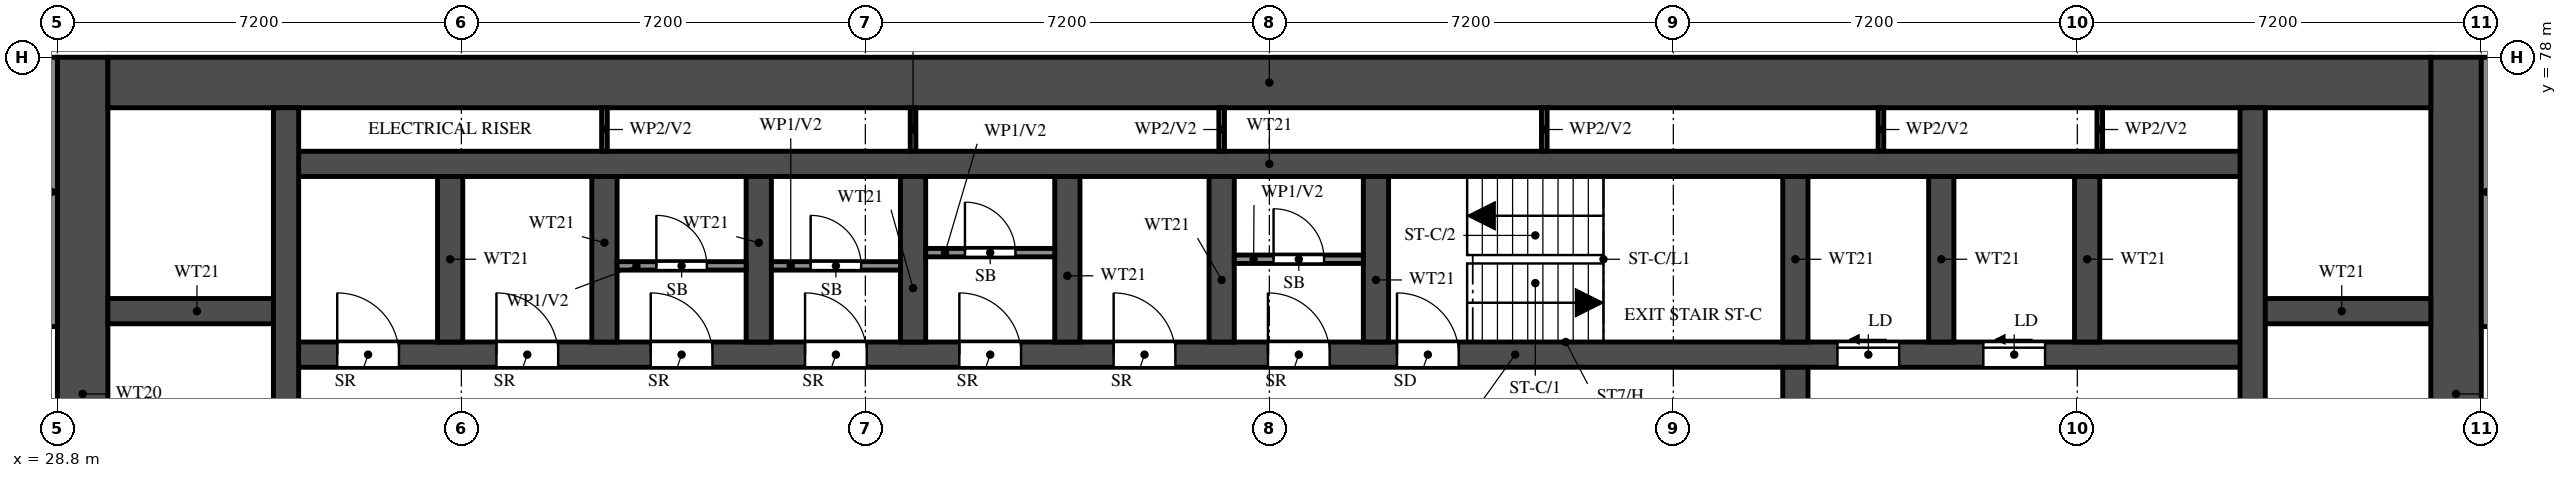
"""IFC4 building model, lengths in metres.
Left out: names, types, materials, properties, quantities, classifications, styles, units other than length and angle.
Written with IfcOpenShell. Run it as: python <this file> out.ifc"""

import sys

from ifc_helpers import new_model, si_unit, direction, frame, frame_2d, origin, place, context, subcontext, project, spatial, rectangle, extrude, element, fill, save


model = new_model("IFC4")
c1 = context("Model", 3, precision=1e-05, world=origin(), true_north=direction((0.0, 1.0)))
c2 = subcontext(c1, "Body", "Model", "MODEL_VIEW")
j1 = project(units=[si_unit("LENGTHUNIT", "METRE"), si_unit("PLANEANGLEUNIT", "RADIAN")], contexts=[c1])
p1 = place(None, origin())
s1 = spatial("IfcSite", under=j1, at=p1, CompositionType="ELEMENT")
p2 = place(p1, origin())
s2 = spatial("IfcBuilding", under=s1, at=p2, CompositionType="ELEMENT")
p3 = place(p2, frame((0.0, 0.0, 69.0)))
s3 = spatial("IfcBuildingStorey", under=s2, at=p3, CompositionType="ELEMENT", Elevation=69.0)
for number, where, z_axis, x_axis in (
    (1, (29.25, 66.0, 0.0), (0.0, 0.0, 1.0), (0.0, 1.0, 0.0)),
    (2, (71.55, 66.0, 0.0), (0.0, 0.0, 1.0), (0.0, 1.0, 0.0)),
):
    element("IfcWall", number, at=place(p3, frame(where, z_axis=z_axis, x_axis=x_axis)), inside=s3, PredefinedType="SHEAR", context=c2, shape_type="SweptSolid", body=[
        extrude(rectangle(XDim=12.0, YDim=0.9, at=frame_2d((6.0, 0.0))), origin(), (0.0, 0.0, 1.0), 3.18),
    ])
p4 = place(p3, frame((29.7, 77.55, 0.0), z_axis=(0.0, 0.0, 1.0), x_axis=(1.0, 0.0, 0.0)))
e3 = element("IfcWall", 3, at=p4, inside=s3, PredefinedType="SHEAR", context=c2, shape_type="SweptSolid", body=[
    extrude(rectangle(XDim=41.4, YDim=0.9, at=frame_2d((20.7, 0.0))), origin(), (0.0, 0.0, 1.0), 3.18),
])
p5 = place(p3, frame((32.875, 72.7, 0.0), z_axis=(0.0, 0.0, 1.0), x_axis=(1.0, 0.0, 0.0)))
e4 = element("IfcWall", 4, at=p5, inside=s3, PredefinedType="SHEAR", context=c2, shape_type="SweptSolid", body=[
    extrude(rectangle(XDim=35.05, YDim=0.45, at=frame_2d((17.525, 0.0))), origin(), (0.0, 0.0, 1.0), 3.18),
])
p6 = place(p5, frame((19.8, 0.0, 0.0)))
e5 = element("IfcOpeningElement", 5, at=p6, cuts=e4, PredefinedType="OPENING", context=c2, shape_type="SweptSolid", body=[
    extrude(rectangle(XDim=1.1, YDim=2.1, at=frame_2d((0.55, 1.05))), frame((0.0, 0.235, 0.0), z_axis=(0.0, -1.0, 0.0), x_axis=(1.0, 0.0, 0.0)), (0.0, 0.0, 1.0), 0.47),
])
p7 = place(p5, frame((27.65, 0.0, 0.0)))
e6 = element("IfcOpeningElement", 6, at=p7, cuts=e4, PredefinedType="OPENING", context=c2, shape_type="SweptSolid", body=[
    extrude(rectangle(XDim=1.1, YDim=2.1, at=frame_2d((0.55, 1.05))), frame((0.0, 0.235, 0.0), z_axis=(0.0, -1.0, 0.0), x_axis=(1.0, 0.0, 0.0)), (0.0, 0.0, 1.0), 0.47),
])
p8 = place(p5, frame((30.25, 0.0, 0.0)))
e7 = element("IfcOpeningElement", 7, at=p8, cuts=e4, PredefinedType="OPENING", context=c2, shape_type="SweptSolid", body=[
    extrude(rectangle(XDim=1.1, YDim=2.1, at=frame_2d((0.55, 1.05))), frame((0.0, 0.235, 0.0), z_axis=(0.0, -1.0, 0.0), x_axis=(1.0, 0.0, 0.0)), (0.0, 0.0, 1.0), 0.47),
])
p9 = place(p5, frame((3.75, 0.0, 0.0)))
e8 = element("IfcOpeningElement", 8, at=p9, cuts=e4, PredefinedType="OPENING", context=c2, shape_type="SweptSolid", body=[
    extrude(rectangle(XDim=1.1, YDim=2.1, at=frame_2d((0.55, 1.05))), frame((0.0, 0.235, 0.0), z_axis=(0.0, -1.0, 0.0), x_axis=(1.0, 0.0, 0.0)), (0.0, 0.0, 1.0), 0.47),
])
p10 = place(p5, frame((6.5, 0.0, 0.0)))
e9 = element("IfcOpeningElement", 9, at=p10, cuts=e4, PredefinedType="OPENING", context=c2, shape_type="SweptSolid", body=[
    extrude(rectangle(XDim=1.1, YDim=2.1, at=frame_2d((0.55, 1.05))), frame((0.0, 0.235, 0.0), z_axis=(0.0, -1.0, 0.0), x_axis=(1.0, 0.0, 0.0)), (0.0, 0.0, 1.0), 0.47),
])
p11 = place(p5, frame((9.25, 0.0, 0.0)))
e10 = element("IfcOpeningElement", 10, at=p11, cuts=e4, PredefinedType="OPENING", context=c2, shape_type="SweptSolid", body=[
    extrude(rectangle(XDim=1.1, YDim=2.1, at=frame_2d((0.55, 1.05))), frame((0.0, 0.235, 0.0), z_axis=(0.0, -1.0, 0.0), x_axis=(1.0, 0.0, 0.0)), (0.0, 0.0, 1.0), 0.47),
])
p12 = place(p5, frame((12.0, 0.0, 0.0)))
e11 = element("IfcOpeningElement", 11, at=p12, cuts=e4, PredefinedType="OPENING", context=c2, shape_type="SweptSolid", body=[
    extrude(rectangle(XDim=1.1, YDim=2.1, at=frame_2d((0.55, 1.05))), frame((0.0, 0.235, 0.0), z_axis=(0.0, -1.0, 0.0), x_axis=(1.0, 0.0, 0.0)), (0.0, 0.0, 1.0), 0.47),
])
p13 = place(p5, frame((14.75, 0.0, 0.0)))
e12 = element("IfcOpeningElement", 12, at=p13, cuts=e4, PredefinedType="OPENING", context=c2, shape_type="SweptSolid", body=[
    extrude(rectangle(XDim=1.1, YDim=2.1, at=frame_2d((0.55, 1.05))), frame((0.0, 0.235, 0.0), z_axis=(0.0, -1.0, 0.0), x_axis=(1.0, 0.0, 0.0)), (0.0, 0.0, 1.0), 0.47),
])
p14 = place(p5, frame((17.5, 0.0, 0.0)))
e13 = element("IfcOpeningElement", 13, at=p14, cuts=e4, PredefinedType="OPENING", context=c2, shape_type="SweptSolid", body=[
    extrude(rectangle(XDim=1.1, YDim=2.1, at=frame_2d((0.55, 1.05))), frame((0.0, 0.235, 0.0), z_axis=(0.0, -1.0, 0.0), x_axis=(1.0, 0.0, 0.0)), (0.0, 0.0, 1.0), 0.47),
])
p15 = place(p5, frame((0.913, 0.0, 0.0)))
e14 = element("IfcOpeningElement", 14, at=p15, cuts=e4, PredefinedType="OPENING", context=c2, shape_type="SweptSolid", body=[
    extrude(rectangle(XDim=1.1, YDim=2.1, at=frame_2d((0.55, 1.05))), frame((0.0, 0.235, 0.0), z_axis=(0.0, -1.0, 0.0), x_axis=(1.0, 0.0, 0.0)), (0.0, 0.0, 1.0), 0.47),
])
p16 = place(p3, frame((32.875, 76.1, 0.0), z_axis=(0.0, 0.0, 1.0), x_axis=(1.0, 0.0, 0.0)))
e15 = element("IfcWall", 15, at=p16, inside=s3, PredefinedType="SHEAR", context=c2, shape_type="SweptSolid", body=[
    extrude(rectangle(XDim=35.05, YDim=0.45, at=frame_2d((17.525, 0.0))), origin(), (0.0, 0.0, 1.0), 3.18),
])
for number, where, z_axis, x_axis in (
    (16, (29.7, 73.475, 0.0), (0.0, 0.0, 1.0), (1.0, 0.0, 0.0)),
    (17, (67.925, 73.475, 0.0), (0.0, 0.0, 1.0), (1.0, 0.0, 0.0)),
):
    element("IfcWall", number, at=place(p3, frame(where, z_axis=z_axis, x_axis=x_axis)), inside=s3, PredefinedType="SHEAR", context=c2, shape_type="SweptSolid", body=[
        extrude(rectangle(XDim=3.175, YDim=0.45, at=frame_2d((1.587, 0.0))), origin(), (0.0, 0.0, 1.0), 3.18),
    ])
p17 = place(p3, frame((32.875, 66.45, 0.0), z_axis=(0.0, 0.0, 1.0), x_axis=(0.0, 1.0, 0.0)))
e18 = element("IfcWall", 18, at=p17, inside=s3, PredefinedType="SHEAR", context=c2, shape_type="SweptSolid", body=[
    extrude(rectangle(XDim=10.65, YDim=0.45, at=frame_2d((5.325, 0.0))), origin(), (0.0, 0.0, 1.0), 3.18),
])
p18 = place(p3, frame((67.925, 66.45, 0.0), z_axis=(0.0, 0.0, 1.0), x_axis=(0.0, 1.0, 0.0)))
e19 = element("IfcWall", 19, at=p18, inside=s3, PredefinedType="SHEAR", context=c2, shape_type="SweptSolid", body=[
    extrude(rectangle(XDim=10.65, YDim=0.45, at=frame_2d((5.325, 0.0))), origin(), (0.0, 0.0, 1.0), 3.18),
])
p19 = place(p18, frame((0.15, 0.0, 0.0)))
e20 = element("IfcOpeningElement", 20, at=p19, cuts=e19, PredefinedType="OPENING", context=c2, shape_type="SweptSolid", body=[
    extrude(rectangle(XDim=1.1, YDim=2.1, at=frame_2d((0.55, 1.05))), frame((0.0, 0.235, 0.0), z_axis=(0.0, -1.0, 0.0), x_axis=(1.0, 0.0, 0.0)), (0.0, 0.0, 1.0), 0.47),
])
p20 = place(p3, frame((59.775, 66.45, 0.0), z_axis=(0.0, 0.0, 1.0), x_axis=(0.0, 1.0, 0.0)))
e21 = element("IfcWall", 21, at=p20, inside=s3, PredefinedType="SHEAR", context=c2, shape_type="SweptSolid", body=[
    extrude(rectangle(XDim=6.025, YDim=0.45, at=frame_2d((3.013, 0.0))), origin(), (0.0, 0.0, 1.0), 3.18),
])
p21 = place(p20, frame((3.85, 0.0, 0.0)))
e22 = element("IfcOpeningElement", 22, at=p21, cuts=e21, PredefinedType="OPENING", context=c2, shape_type="SweptSolid", body=[
    extrude(rectangle(XDim=1.2, YDim=2.1, at=frame_2d((0.6, 1.05))), frame((0.0, 0.235, 0.0), z_axis=(0.0, -1.0, 0.0), x_axis=(1.0, 0.0, 0.0)), (0.0, 0.0, 1.0), 0.47),
])
for number, where, z_axis, x_axis in (
    (23, (59.775, 72.925, 0.0), (0.0, 0.0, 1.0), (0.0, 1.0, 0.0)),
    (24, (35.8, 72.925, 0.0), (0.0, 0.0, 1.0), (0.0, 1.0, 0.0)),
    (25, (38.55, 72.925, 0.0), (0.0, 0.0, 1.0), (0.0, 1.0, 0.0)),
    (26, (41.3, 72.925, 0.0), (0.0, 0.0, 1.0), (0.0, 1.0, 0.0)),
    (27, (44.05, 72.925, 0.0), (0.0, 0.0, 1.0), (0.0, 1.0, 0.0)),
    (28, (46.8, 72.925, 0.0), (0.0, 0.0, 1.0), (0.0, 1.0, 0.0)),
    (29, (49.55, 72.925, 0.0), (0.0, 0.0, 1.0), (0.0, 1.0, 0.0)),
    (30, (52.3, 72.925, 0.0), (0.0, 0.0, 1.0), (0.0, 1.0, 0.0)),
    (31, (62.375, 72.925, 0.0), (0.0, 0.0, 1.0), (0.0, 1.0, 0.0)),
    (32, (64.975, 72.925, 0.0), (0.0, 0.0, 1.0), (0.0, 1.0, 0.0)),
):
    element("IfcWall", number, at=place(p3, frame(where, z_axis=z_axis, x_axis=x_axis)), inside=s3, PredefinedType="SHEAR", context=c2, shape_type="SweptSolid", body=[
        extrude(rectangle(XDim=2.95, YDim=0.45, at=frame_2d((1.475, 0.0))), origin(), (0.0, 0.0, 1.0), 3.18),
    ])
p22 = place(p3, frame((38.775, 74.282, 0.0), z_axis=(0.0, 0.0, 1.0), x_axis=(1.0, 0.0, 0.0)))
e33 = element("IfcWall", 33, at=p22, inside=s3, PredefinedType="PARTITIONING", context=c2, shape_type="SweptSolid", body=[
    extrude(rectangle(XDim=2.3, YDim=0.15, at=frame_2d((1.15, 0.0))), origin(), (0.0, 0.0, 1.0), 3.18),
])
p23 = place(p22, frame((0.7, 0.0, 0.0)))
e34 = element("IfcOpeningElement", 34, at=p23, cuts=e33, PredefinedType="OPENING", context=c2, shape_type="SweptSolid", body=[
    extrude(rectangle(XDim=0.9, YDim=2.1, at=frame_2d((0.45, 1.05))), frame((0.0, 0.085, 0.0), z_axis=(0.0, -1.0, 0.0), x_axis=(1.0, 0.0, 0.0)), (0.0, 0.0, 1.0), 0.17),
])
p24 = place(p3, frame((41.525, 74.282, 0.0), z_axis=(0.0, 0.0, 1.0), x_axis=(1.0, 0.0, 0.0)))
e35 = element("IfcWall", 35, at=p24, inside=s3, PredefinedType="PARTITIONING", context=c2, shape_type="SweptSolid", body=[
    extrude(rectangle(XDim=2.3, YDim=0.15, at=frame_2d((1.15, 0.0))), origin(), (0.0, 0.0, 1.0), 3.18),
])
p25 = place(p24, frame((0.7, 0.0, 0.0)))
e36 = element("IfcOpeningElement", 36, at=p25, cuts=e35, PredefinedType="OPENING", context=c2, shape_type="SweptSolid", body=[
    extrude(rectangle(XDim=0.9, YDim=2.1, at=frame_2d((0.45, 1.05))), frame((0.0, 0.085, 0.0), z_axis=(0.0, -1.0, 0.0), x_axis=(1.0, 0.0, 0.0)), (0.0, 0.0, 1.0), 0.17),
])
p26 = place(p3, frame((44.275, 74.518, 0.0), z_axis=(0.0, 0.0, 1.0), x_axis=(1.0, 0.0, 0.0)))
e37 = element("IfcWall", 37, at=p26, inside=s3, PredefinedType="PARTITIONING", context=c2, shape_type="SweptSolid", body=[
    extrude(rectangle(XDim=2.3, YDim=0.15, at=frame_2d((1.15, 0.0))), origin(), (0.0, 0.0, 1.0), 3.18),
])
p27 = place(p26, frame((0.7, 0.0, 0.0)))
e38 = element("IfcOpeningElement", 38, at=p27, cuts=e37, PredefinedType="OPENING", context=c2, shape_type="SweptSolid", body=[
    extrude(rectangle(XDim=0.9, YDim=2.1, at=frame_2d((0.45, 1.05))), frame((0.0, 0.085, 0.0), z_axis=(0.0, -1.0, 0.0), x_axis=(1.0, 0.0, 0.0)), (0.0, 0.0, 1.0), 0.17),
])
p28 = place(p3, frame((49.775, 74.4, 0.0), z_axis=(0.0, 0.0, 1.0), x_axis=(1.0, 0.0, 0.0)))
e39 = element("IfcWall", 39, at=p28, inside=s3, PredefinedType="PARTITIONING", context=c2, shape_type="SweptSolid", body=[
    extrude(rectangle(XDim=2.3, YDim=0.15, at=frame_2d((1.15, 0.0))), origin(), (0.0, 0.0, 1.0), 3.18),
])
p29 = place(p28, frame((0.7, 0.0, 0.0)))
e40 = element("IfcOpeningElement", 40, at=p29, cuts=e39, PredefinedType="OPENING", context=c2, shape_type="SweptSolid", body=[
    extrude(rectangle(XDim=0.9, YDim=2.1, at=frame_2d((0.45, 1.05))), frame((0.0, 0.085, 0.0), z_axis=(0.0, -1.0, 0.0), x_axis=(1.0, 0.0, 0.0)), (0.0, 0.0, 1.0), 0.17),
])
for number, where, z_axis, x_axis in (
    (41, (38.55, 76.325, 0.0), (0.0, 0.0, 1.0), (0.0, 1.0, 0.0)),
    (42, (44.05, 76.325, 0.0), (0.0, 0.0, 1.0), (0.0, 1.0, 0.0)),
    (43, (49.55, 76.325, 0.0), (0.0, 0.0, 1.0), (0.0, 1.0, 0.0)),
    (44, (55.3, 76.325, 0.0), (0.0, 0.0, 1.0), (0.0, 1.0, 0.0)),
    (45, (61.3, 76.325, 0.0), (0.0, 0.0, 1.0), (0.0, 1.0, 0.0)),
    (46, (65.2, 76.325, 0.0), (0.0, 0.0, 1.0), (0.0, 1.0, 0.0)),
):
    element("IfcWall", number, at=place(p3, frame(where, z_axis=z_axis, x_axis=x_axis)), inside=s3, PredefinedType="PARTITIONING", context=c2, shape_type="SweptSolid", body=[
        extrude(rectangle(XDim=0.775, YDim=0.1, at=frame_2d((0.388, 0.0))), origin(), (0.0, 0.0, 1.0), 3.18),
    ])
for number, where, z_axis, x_axis in (
    (47, (28.7, 73.2, 0.0), (0.0, 0.0, 1.0), (0.0, 1.0, 0.0)),
    (48, (72.1, 73.2, 0.0), (0.0, 0.0, 1.0), (0.0, 1.0, 0.0)),
):
    element("IfcWall", number, at=place(p3, frame(where, z_axis=z_axis, x_axis=x_axis)), inside=s3, PredefinedType="SOLIDWALL", context=c2, shape_type="SweptSolid", body=[
        extrude(rectangle(XDim=4.8, YDim=0.2, at=frame_2d((2.4, 0.0))), origin(), (0.0, 0.0, 1.0), 3.18),
    ])
p30 = place(p6, origin())
e49 = element("IfcDoor", 49, at=p30, inside=s3, OperationType="SINGLE_SWING_LEFT", PredefinedType="DOOR", context=c2, shape_type="SweptSolid", body=[
    extrude(rectangle(XDim=1.1, YDim=2.1, at=frame_2d((0.55, 1.05))), frame((0.0, 0.025, 0.0), z_axis=(0.0, -1.0, 0.0), x_axis=(1.0, 0.0, 0.0)), (0.0, 0.0, 1.0), 0.05),
])
fill(e5, e49)
p31 = place(p7, origin())
e50 = element("IfcDoor", 50, at=p31, inside=s3, OperationType="SLIDING_TO_LEFT", PredefinedType="DOOR", context=c2, shape_type="SweptSolid", body=[
    extrude(rectangle(XDim=1.1, YDim=2.1, at=frame_2d((0.55, 1.05))), frame((0.0, 0.025, 0.0), z_axis=(0.0, -1.0, 0.0), x_axis=(1.0, 0.0, 0.0)), (0.0, 0.0, 1.0), 0.05),
])
fill(e6, e50)
p32 = place(p8, origin())
e51 = element("IfcDoor", 51, at=p32, inside=s3, OperationType="SLIDING_TO_LEFT", PredefinedType="DOOR", context=c2, shape_type="SweptSolid", body=[
    extrude(rectangle(XDim=1.1, YDim=2.1, at=frame_2d((0.55, 1.05))), frame((0.0, 0.025, 0.0), z_axis=(0.0, -1.0, 0.0), x_axis=(1.0, 0.0, 0.0)), (0.0, 0.0, 1.0), 0.05),
])
fill(e7, e51)
p33 = place(p9, origin())
e52 = element("IfcDoor", 52, at=p33, inside=s3, OperationType="SINGLE_SWING_LEFT", PredefinedType="DOOR", context=c2, shape_type="SweptSolid", body=[
    extrude(rectangle(XDim=1.1, YDim=2.1, at=frame_2d((0.55, 1.05))), frame((0.0, 0.025, 0.0), z_axis=(0.0, -1.0, 0.0), x_axis=(1.0, 0.0, 0.0)), (0.0, 0.0, 1.0), 0.05),
])
fill(e8, e52)
p34 = place(p10, origin())
e53 = element("IfcDoor", 53, at=p34, inside=s3, OperationType="SINGLE_SWING_LEFT", PredefinedType="DOOR", context=c2, shape_type="SweptSolid", body=[
    extrude(rectangle(XDim=1.1, YDim=2.1, at=frame_2d((0.55, 1.05))), frame((0.0, 0.025, 0.0), z_axis=(0.0, -1.0, 0.0), x_axis=(1.0, 0.0, 0.0)), (0.0, 0.0, 1.0), 0.05),
])
fill(e9, e53)
p35 = place(p23, origin())
e54 = element("IfcDoor", 54, at=p35, inside=s3, OperationType="SINGLE_SWING_RIGHT", PredefinedType="DOOR", context=c2, shape_type="SweptSolid", body=[
    extrude(rectangle(XDim=0.9, YDim=2.1, at=frame_2d((0.45, 1.05))), frame((0.0, 0.025, 0.0), z_axis=(0.0, -1.0, 0.0), x_axis=(1.0, 0.0, 0.0)), (0.0, 0.0, 1.0), 0.05),
])
fill(e34, e54)
p36 = place(p11, origin())
e55 = element("IfcDoor", 55, at=p36, inside=s3, OperationType="SINGLE_SWING_LEFT", PredefinedType="DOOR", context=c2, shape_type="SweptSolid", body=[
    extrude(rectangle(XDim=1.1, YDim=2.1, at=frame_2d((0.55, 1.05))), frame((0.0, 0.025, 0.0), z_axis=(0.0, -1.0, 0.0), x_axis=(1.0, 0.0, 0.0)), (0.0, 0.0, 1.0), 0.05),
])
fill(e10, e55)
p37 = place(p25, origin())
e56 = element("IfcDoor", 56, at=p37, inside=s3, OperationType="SINGLE_SWING_LEFT", PredefinedType="DOOR", context=c2, shape_type="SweptSolid", body=[
    extrude(rectangle(XDim=0.9, YDim=2.1, at=frame_2d((0.45, 1.05))), frame((0.0, 0.025, 0.0), z_axis=(0.0, -1.0, 0.0), x_axis=(1.0, 0.0, 0.0)), (0.0, 0.0, 1.0), 0.05),
])
fill(e36, e56)
p38 = place(p12, origin())
e57 = element("IfcDoor", 57, at=p38, inside=s3, OperationType="SINGLE_SWING_LEFT", PredefinedType="DOOR", context=c2, shape_type="SweptSolid", body=[
    extrude(rectangle(XDim=1.1, YDim=2.1, at=frame_2d((0.55, 1.05))), frame((0.0, 0.025, 0.0), z_axis=(0.0, -1.0, 0.0), x_axis=(1.0, 0.0, 0.0)), (0.0, 0.0, 1.0), 0.05),
])
fill(e11, e57)
p39 = place(p27, origin())
e58 = element("IfcDoor", 58, at=p39, inside=s3, OperationType="SINGLE_SWING_LEFT", PredefinedType="DOOR", context=c2, shape_type="SweptSolid", body=[
    extrude(rectangle(XDim=0.9, YDim=2.1, at=frame_2d((0.45, 1.05))), frame((0.0, 0.025, 0.0), z_axis=(0.0, -1.0, 0.0), x_axis=(1.0, 0.0, 0.0)), (0.0, 0.0, 1.0), 0.05),
])
fill(e38, e58)
p40 = place(p13, origin())
e59 = element("IfcDoor", 59, at=p40, inside=s3, OperationType="SINGLE_SWING_LEFT", PredefinedType="DOOR", context=c2, shape_type="SweptSolid", body=[
    extrude(rectangle(XDim=1.1, YDim=2.1, at=frame_2d((0.55, 1.05))), frame((0.0, 0.025, 0.0), z_axis=(0.0, -1.0, 0.0), x_axis=(1.0, 0.0, 0.0)), (0.0, 0.0, 1.0), 0.05),
])
fill(e12, e59)
p41 = place(p14, origin())
e60 = element("IfcDoor", 60, at=p41, inside=s3, OperationType="SINGLE_SWING_LEFT", PredefinedType="DOOR", context=c2, shape_type="SweptSolid", body=[
    extrude(rectangle(XDim=1.1, YDim=2.1, at=frame_2d((0.55, 1.05))), frame((0.0, 0.025, 0.0), z_axis=(0.0, -1.0, 0.0), x_axis=(1.0, 0.0, 0.0)), (0.0, 0.0, 1.0), 0.05),
])
fill(e13, e60)
p42 = place(p29, origin())
e61 = element("IfcDoor", 61, at=p42, inside=s3, OperationType="SINGLE_SWING_RIGHT", PredefinedType="DOOR", context=c2, shape_type="SweptSolid", body=[
    extrude(rectangle(XDim=0.9, YDim=2.1, at=frame_2d((0.45, 1.05))), frame((0.0, 0.025, 0.0), z_axis=(0.0, -1.0, 0.0), x_axis=(1.0, 0.0, 0.0)), (0.0, 0.0, 1.0), 0.05),
])
fill(e40, e61)
p43 = place(p15, origin())
e62 = element("IfcDoor", 62, at=p43, inside=s3, OperationType="SINGLE_SWING_LEFT", PredefinedType="DOOR", context=c2, shape_type="SweptSolid", body=[
    extrude(rectangle(XDim=1.1, YDim=2.1, at=frame_2d((0.55, 1.05))), frame((0.0, 0.025, 0.0), z_axis=(0.0, -1.0, 0.0), x_axis=(1.0, 0.0, 0.0)), (0.0, 0.0, 1.0), 0.05),
])
fill(e14, e62)
save(model, sys.argv[1])
